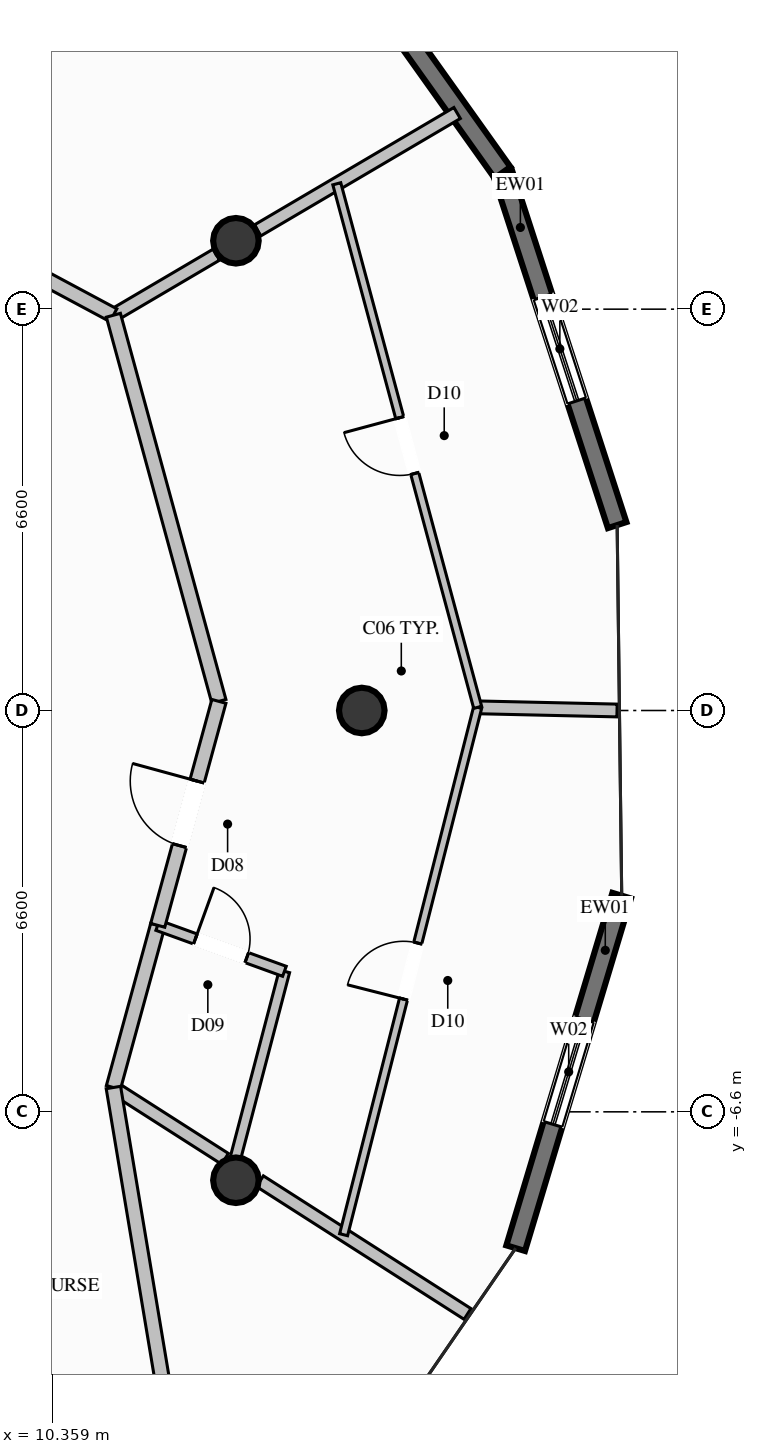
"""IFC4 building model, lengths in metres.
Left out: names, types, materials, properties, quantities, classifications, styles, units other than length and angle.
Written with IfcOpenShell. Run it as: python <this file> out.ifc"""

import sys

from ifc_helpers import new_model, si_unit, direction, frame, frame_2d, origin, origin_2d, place, context, subcontext, project, spatial, rectangle, circle, extrude, element, fill, save


model = new_model("IFC4")
c1 = context("Model", 3, precision=1e-05, world=origin(), true_north=direction((0.0, 1.0)))
c2 = subcontext(c1, "Body", "Model", "MODEL_VIEW")
j1 = project(units=[si_unit("LENGTHUNIT", "METRE"), si_unit("PLANEANGLEUNIT", "RADIAN")], contexts=[c1])
p1 = place(None, origin())
s1 = spatial("IfcSite", under=j1, at=p1, CompositionType="ELEMENT")
p2 = place(p1, origin())
s2 = spatial("IfcBuilding", under=s1, at=p2, CompositionType="ELEMENT")
p3 = place(p2, frame((0.0, 0.0, 250.6)))
s3 = spatial("IfcBuildingStorey", under=s2, at=p3, CompositionType="ELEMENT", Elevation=250.6)
for number, where, z_axis, x_axis in (
    (1, (15.45, 0.0, 0.0), (0.0, 0.0, 1.0), (1.0, 0.0, 0.0)),
    (2, (13.38, 7.725, 0.0), (0.0, 0.0, 1.0), (1.0, 0.0, 0.0)),
    (3, (13.38, -7.725, 0.0), (0.0, 0.0, 1.0), (1.0, 0.0, 0.0)),
):
    element("IfcColumn", number, at=place(p3, frame(where, z_axis=z_axis, x_axis=x_axis)), inside=s3, PredefinedType="COLUMN", context=c2, shape_type="SweptSolid", body=[
        extrude(circle(Radius=0.375, at=origin_2d()), origin(), (0.0, 0.0, 1.0), 3.8),
    ])
p4 = place(p3, frame((19.725, -3.045, 0.0), z_axis=(0.0, 0.0, 1.0), x_axis=(-0.288106265848, -0.957598443806, 0.0)))
e4 = element("IfcWall", 4, at=p4, inside=s3, PredefinedType="SOLIDWALL", context=c2, shape_type="SweptSolid", body=[
    extrude(rectangle(XDim=6.054, YDim=0.32, at=frame_2d((3.027, 0.0))), origin(), (0.0, 0.0, 1.0), 3.57),
])
p5 = place(p4, frame((2.127, 0.0, 0.35)))
e5 = element("IfcOpeningElement", 5, at=p5, cuts=e4, PredefinedType="OPENING", context=c2, shape_type="SweptSolid", body=[
    extrude(rectangle(XDim=1.8, YDim=2.6, at=frame_2d((0.9, 1.3))), frame((0.0, 0.17, 0.0), z_axis=(0.0, -1.0, 0.0), x_axis=(1.0, 0.0, 0.0)), (0.0, 0.0, 1.0), 0.34),
])
p6 = place(p3, frame((17.765, 8.846, 0.0), z_axis=(0.0, 0.0, 1.0), x_axis=(0.309238214559, -0.950984609053, 0.0)))
e6 = element("IfcWall", 6, at=p6, inside=s3, PredefinedType="SOLIDWALL", context=c2, shape_type="SweptSolid", body=[
    extrude(rectangle(XDim=6.096, YDim=0.32, at=frame_2d((3.048, 0.0))), origin(), (0.0, 0.0, 1.0), 3.57),
])
p7 = place(p6, frame((2.148, 0.0, 0.35)))
e7 = element("IfcOpeningElement", 7, at=p7, cuts=e6, PredefinedType="OPENING", context=c2, shape_type="SweptSolid", body=[
    extrude(rectangle(XDim=1.8, YDim=2.6, at=frame_2d((0.9, 1.3))), frame((0.0, 0.17, 0.0), z_axis=(0.0, -1.0, 0.0), x_axis=(1.0, 0.0, 0.0)), (0.0, 0.0, 1.0), 0.34),
])
p8 = place(p3, frame((14.253, 13.776, 0.0), z_axis=(0.0, 0.0, 1.0), x_axis=(0.5802075705, -0.814468645888, 0.0)))
e8 = element("IfcWall", 8, at=p8, inside=s3, PredefinedType="SOLIDWALL", context=c2, shape_type="SweptSolid", body=[
    extrude(rectangle(XDim=6.053, YDim=0.32, at=frame_2d((3.026, 0.0))), origin(), (0.0, 0.0, 1.0), 3.57),
])
p9 = place(p8, frame((1.461, 0.0, 0.35)))
e9 = element("IfcOpeningElement", 9, at=p9, cuts=e8, PredefinedType="OPENING", context=c2, shape_type="SweptSolid", body=[
    extrude(rectangle(XDim=1.8, YDim=2.6, at=frame_2d((0.9, 1.3))), frame((0.0, 0.17, 0.0), z_axis=(0.0, -1.0, 0.0), x_axis=(1.0, 0.0, 0.0)), (0.0, 0.0, 1.0), 0.34),
])
p10 = place(p3, frame((11.365, 6.5, 0.0), z_axis=(0.0, 0.0, 1.0), x_axis=(0.861902264102, 0.507074439443, 0.0)))
e10 = element("IfcWall", 10, at=p10, inside=s3, PredefinedType="PARTITIONING", context=c2, shape_type="SweptSolid", body=[
    extrude(rectangle(XDim=1.964, YDim=0.21, at=frame_2d((0.982, 0.0))), origin(), (0.0, 0.0, 1.0), 3.086),
])
p11 = place(p3, frame((13.736, 7.895, 0.0), z_axis=(0.0, 0.0, 1.0), x_axis=(0.861896304209, 0.507084569664, 0.0)))
e11 = element("IfcWall", 11, at=p11, inside=s3, PredefinedType="PARTITIONING", context=c2, shape_type="SweptSolid", body=[
    extrude(rectangle(XDim=3.808, YDim=0.21, at=frame_2d((1.904, 0.0))), origin(), (0.0, 0.0, 1.0), 3.57),
])
p12 = place(p3, frame((11.365, -6.2, 0.0), z_axis=(0.0, 0.0, 1.0), x_axis=(0.842537994554, -0.538636916422, 0.0)))
e12 = element("IfcWall", 12, at=p12, inside=s3, PredefinedType="PARTITIONING", context=c2, shape_type="SweptSolid", body=[
    extrude(rectangle(XDim=2.178, YDim=0.21, at=frame_2d((1.089, 0.0))), origin(), (0.0, 0.0, 1.0), 3.086),
])
p13 = place(p3, frame((13.775, -7.741, 0.0), z_axis=(0.0, 0.0, 1.0), x_axis=(0.842483599118, -0.538721992514, 0.0)))
e13 = element("IfcWall", 13, at=p13, inside=s3, PredefinedType="PARTITIONING", context=c2, shape_type="SweptSolid", body=[
    extrude(rectangle(XDim=4.052, YDim=0.21, at=frame_2d((2.026, 0.0))), origin(), (0.0, 0.0, 1.0), 3.57),
])
p14 = place(p3, frame((7.35, 8.65, 0.0), z_axis=(0.0, 0.0, 1.0), x_axis=(0.881565227264, -0.472062231151, 0.0)))
e14 = element("IfcWall", 14, at=p14, inside=s3, PredefinedType="PARTITIONING", context=c2, shape_type="SweptSolid", body=[
    extrude(rectangle(XDim=4.554, YDim=0.24, at=frame_2d((2.277, 0.0))), origin(), (0.0, 0.0, 1.0), 3.57),
])
p15 = place(p14, frame((1.777, 0.0, 0.0)))
e15 = element("IfcOpeningElement", 15, at=p15, cuts=e14, PredefinedType="OPENING", context=c2, shape_type="SweptSolid", body=[
    extrude(rectangle(XDim=1.0, YDim=2.2, at=frame_2d((0.5, 1.1))), frame((0.0, 0.13, 0.0), z_axis=(0.0, -1.0, 0.0), x_axis=(1.0, 0.0, 0.0)), (0.0, 0.0, 1.0), 0.26),
])
p16 = place(p3, frame((11.365, -6.2, 0.0), z_axis=(0.0, 0.0, 1.0), x_axis=(0.263670269996, 0.964612869871, 0.0)))
e16 = element("IfcWall", 16, at=p16, inside=s3, PredefinedType="PARTITIONING", context=c2, shape_type="SweptSolid", body=[
    extrude(rectangle(XDim=2.765, YDim=0.24, at=frame_2d((1.382, 0.0))), origin(), (0.0, 0.0, 1.0), 3.57),
])
p17 = place(p3, frame((13.345, -7.466, 0.0), z_axis=(0.0, 0.0, 1.0), x_axis=(0.253626036533, 0.967302348593, 0.0)))
e17 = element("IfcWall", 17, at=p17, inside=s3, PredefinedType="PLUMBINGWALL", context=c2, shape_type="SweptSolid", body=[
    extrude(rectangle(XDim=3.284, YDim=0.175, at=frame_2d((1.642, 0.0))), origin(), (0.0, 0.0, 1.0), 3.139),
])
p18 = place(p3, frame((12.094, -3.533, 0.0), z_axis=(0.0, 0.0, 1.0), x_axis=(0.940040760774, -0.341062117633, 0.0)))
e18 = element("IfcWall", 18, at=p18, inside=s3, PredefinedType="PLUMBINGWALL", context=c2, shape_type="SweptSolid", body=[
    extrude(rectangle(XDim=2.217, YDim=0.175, at=frame_2d((1.108, 0.0))), origin(), (0.0, 0.0, 1.0), 3.57),
])
p19 = place(p18, frame((0.658, 0.0, 0.0)))
e19 = element("IfcOpeningElement", 19, at=p19, cuts=e18, PredefinedType="OPENING", context=c2, shape_type="SweptSolid", body=[
    extrude(rectangle(XDim=0.9, YDim=2.1, at=frame_2d((0.45, 1.05))), frame((0.0, 0.098, 0.0), z_axis=(0.0, -1.0, 0.0), x_axis=(1.0, 0.0, 0.0)), (0.0, 0.0, 1.0), 0.195),
])
p20 = place(p3, frame((17.356, 0.052, 0.0), z_axis=(0.0, 0.0, 1.0), x_axis=(0.999742714437, -0.022682701126, 0.0)))
e20 = element("IfcWall", 20, at=p20, inside=s3, PredefinedType="PARTITIONING", context=c2, shape_type="SweptSolid", body=[
    extrude(rectangle(XDim=2.292, YDim=0.21, at=frame_2d((1.146, 0.0))), origin(), (0.0, 0.0, 1.0), 3.57),
])
p21 = place(p3, frame((13.1, 0.15, 0.0), z_axis=(0.0, 0.0, 1.0), x_axis=(-0.263578683342, 0.964637899778, 0.0)))
e21 = element("IfcWall", 21, at=p21, inside=s3, PredefinedType="PARTITIONING", context=c2, shape_type="SweptSolid", body=[
    extrude(rectangle(XDim=6.583, YDim=0.24, at=frame_2d((3.292, 0.0))), origin(), (0.0, 0.0, 1.0), 3.57),
])
p22 = place(p3, frame((12.094, -3.533, 0.0), z_axis=(0.0, 0.0, 1.0), x_axis=(0.263528615014, 0.964651579104, 0.0)))
e22 = element("IfcWall", 22, at=p22, inside=s3, PredefinedType="PARTITIONING", context=c2, shape_type="SweptSolid", body=[
    extrude(rectangle(XDim=3.818, YDim=0.24, at=frame_2d((1.909, 0.0))), origin(), (0.0, 0.0, 1.0), 3.57),
])
p23 = place(p22, frame((1.359, 0.0, 0.0)))
e23 = element("IfcOpeningElement", 23, at=p23, cuts=e22, PredefinedType="OPENING", context=c2, shape_type="SweptSolid", body=[
    extrude(rectangle(XDim=1.1, YDim=2.3, at=frame_2d((0.55, 1.15))), frame((0.0, 0.13, 0.0), z_axis=(0.0, -1.0, 0.0), x_axis=(1.0, 0.0, 0.0)), (0.0, 0.0, 1.0), 0.26),
])
p24 = place(p3, frame((15.151, -8.621, 0.0), z_axis=(0.0, 0.0, 1.0), x_axis=(0.246404425265, 0.969167095608, 0.0)))
e24 = element("IfcWall", 24, at=p24, inside=s3, PredefinedType="PARTITIONING", context=c2, shape_type="SweptSolid", body=[
    extrude(rectangle(XDim=8.949, YDim=0.135, at=frame_2d((4.475, 0.0))), origin(), (0.0, 0.0, 1.0), 3.57),
])
p25 = place(p24, frame((3.999, 0.0, 0.0)))
e25 = element("IfcOpeningElement", 25, at=p25, cuts=e24, PredefinedType="OPENING", context=c2, shape_type="SweptSolid", body=[
    extrude(rectangle(XDim=0.95, YDim=2.1, at=frame_2d((0.475, 1.05))), frame((0.0, 0.078, 0.0), z_axis=(0.0, -1.0, 0.0), x_axis=(1.0, 0.0, 0.0)), (0.0, 0.0, 1.0), 0.155),
])
p26 = place(p3, frame((17.356, 0.052, 0.0), z_axis=(0.0, 0.0, 1.0), x_axis=(-0.259846800499, 0.965649853866, 0.0)))
e26 = element("IfcWall", 26, at=p26, inside=s3, PredefinedType="PARTITIONING", context=c2, shape_type="SweptSolid", body=[
    extrude(rectangle(XDim=8.917, YDim=0.135, at=frame_2d((4.458, 0.0))), origin(), (0.0, 0.0, 1.0), 3.57),
])
p27 = place(p26, frame((3.983, 0.0, 0.0)))
e27 = element("IfcOpeningElement", 27, at=p27, cuts=e26, PredefinedType="OPENING", context=c2, shape_type="SweptSolid", body=[
    extrude(rectangle(XDim=0.95, YDim=2.1, at=frame_2d((0.475, 1.05))), frame((0.0, 0.078, 0.0), z_axis=(0.0, -1.0, 0.0), x_axis=(1.0, 0.0, 0.0)), (0.0, 0.0, 1.0), 0.155),
])
p28 = place(p3, frame((12.3, -11.8, 0.0), z_axis=(0.0, 0.0, 1.0), x_axis=(-0.164691848211, 0.986345068996, 0.0)))
e28 = element("IfcWall", 28, at=p28, inside=s3, PredefinedType="PARTITIONING", context=c2, shape_type="SweptSolid", body=[
    extrude(rectangle(XDim=5.678, YDim=0.24, at=frame_2d((2.839, 0.0))), origin(), (0.0, 0.0, 1.0), 3.57),
])
p29 = place(p5, origin())
e29 = element("IfcWindow", 29, at=p29, inside=s3, PartitioningType="SINGLE_PANEL", PredefinedType="WINDOW", context=c2, shape_type="SweptSolid", body=[
    extrude(rectangle(XDim=1.8, YDim=2.6, at=frame_2d((0.9, 1.3))), frame((0.0, 0.03, 0.0), z_axis=(0.0, -1.0, 0.0), x_axis=(1.0, 0.0, 0.0)), (0.0, 0.0, 1.0), 0.06),
])
fill(e5, e29)
p30 = place(p7, origin())
e30 = element("IfcWindow", 30, at=p30, inside=s3, PartitioningType="SINGLE_PANEL", PredefinedType="WINDOW", context=c2, shape_type="SweptSolid", body=[
    extrude(rectangle(XDim=1.8, YDim=2.6, at=frame_2d((0.9, 1.3))), frame((0.0, 0.03, 0.0), z_axis=(0.0, -1.0, 0.0), x_axis=(1.0, 0.0, 0.0)), (0.0, 0.0, 1.0), 0.06),
])
fill(e7, e30)
p31 = place(p19, origin())
e31 = element("IfcDoor", 31, at=p31, inside=s3, OperationType="SINGLE_SWING_LEFT", PredefinedType="DOOR", context=c2, shape_type="SweptSolid", body=[
    extrude(rectangle(XDim=0.9, YDim=2.1, at=frame_2d((0.45, 1.05))), frame((0.0, 0.025, 0.0), z_axis=(0.0, -1.0, 0.0), x_axis=(1.0, 0.0, 0.0)), (0.0, 0.0, 1.0), 0.05),
])
fill(e19, e31)
p32 = place(p23, origin())
e32 = element("IfcDoor", 32, at=p32, inside=s3, OperationType="SINGLE_SWING_RIGHT", PredefinedType="DOOR", context=c2, shape_type="SweptSolid", body=[
    extrude(rectangle(XDim=1.1, YDim=2.3, at=frame_2d((0.55, 1.15))), frame((0.0, 0.025, 0.0), z_axis=(0.0, -1.0, 0.0), x_axis=(1.0, 0.0, 0.0)), (0.0, 0.0, 1.0), 0.05),
])
fill(e23, e32)
p33 = place(p25, origin())
e33 = element("IfcDoor", 33, at=p33, inside=s3, OperationType="SINGLE_SWING_LEFT", PredefinedType="DOOR", context=c2, shape_type="SweptSolid", body=[
    extrude(rectangle(XDim=0.95, YDim=2.1, at=frame_2d((0.475, 1.05))), frame((0.0, 0.025, 0.0), z_axis=(0.0, -1.0, 0.0), x_axis=(1.0, 0.0, 0.0)), (0.0, 0.0, 1.0), 0.05),
])
fill(e25, e33)
p34 = place(p27, origin())
e34 = element("IfcDoor", 34, at=p34, inside=s3, OperationType="SINGLE_SWING_RIGHT", PredefinedType="DOOR", context=c2, shape_type="SweptSolid", body=[
    extrude(rectangle(XDim=0.95, YDim=2.1, at=frame_2d((0.475, 1.05))), frame((0.0, 0.025, 0.0), z_axis=(0.0, -1.0, 0.0), x_axis=(1.0, 0.0, 0.0)), (0.0, 0.0, 1.0), 0.05),
])
fill(e27, e34)
save(model, sys.argv[1])
